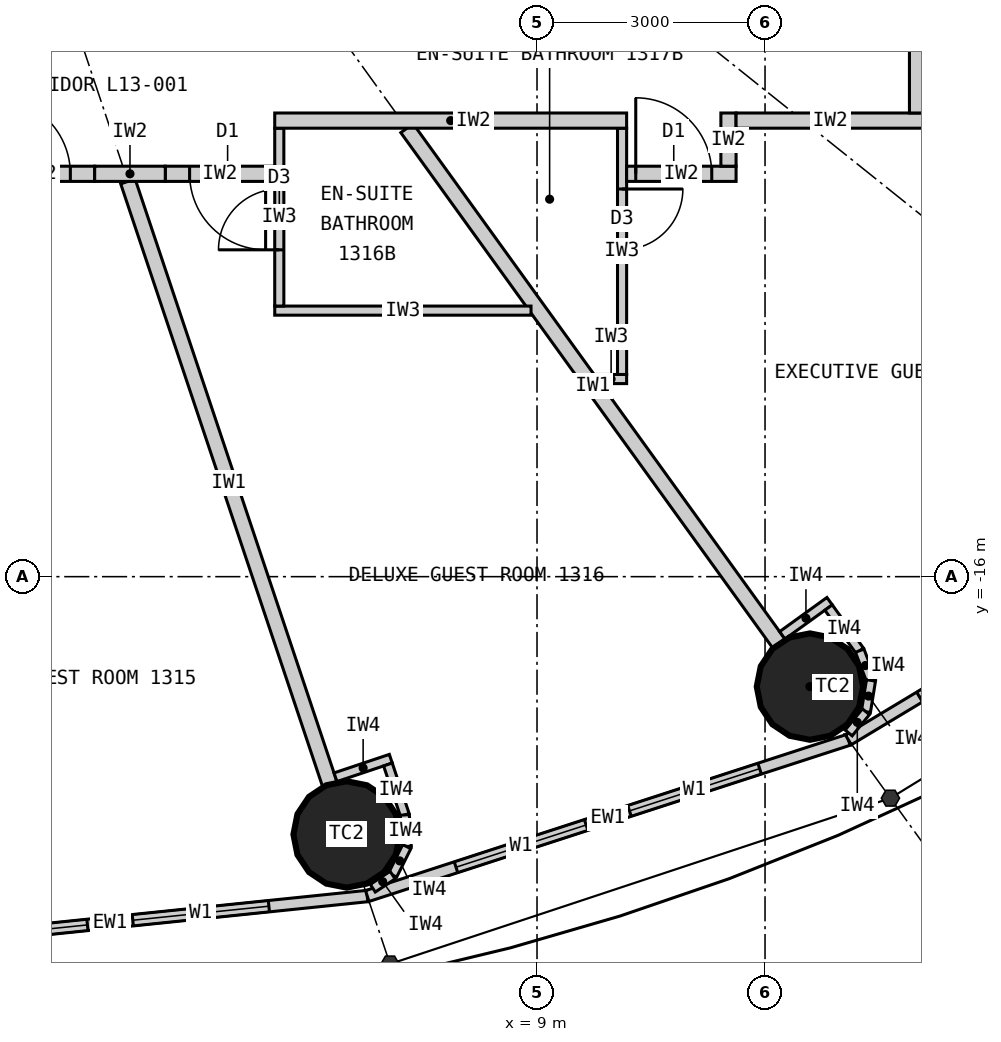
"""IFC4 building model, lengths in metres.
Left out: names, types, materials, properties, quantities, classifications, styles, units other than length and angle.
Written with IfcOpenShell. Run it as: python <this file> out.ifc"""

import sys

from ifc_helpers import new_model, si_unit, direction, frame, frame_2d, origin, origin_2d, place, context, subcontext, project, spatial, rectangle, circle, extrude, element, fill, save


model = new_model("IFC4")
c1 = context("Model", 3, precision=1e-05, world=origin(), true_north=direction((0.0, 1.0)))
c2 = subcontext(c1, "Body", "Model", "MODEL_VIEW")
j1 = project(units=[si_unit("LENGTHUNIT", "METRE"), si_unit("PLANEANGLEUNIT", "RADIAN")], contexts=[c1])
p1 = place(None, origin())
s1 = spatial("IfcSite", under=j1, at=p1, CompositionType="ELEMENT")
p2 = place(p1, origin())
s2 = spatial("IfcBuilding", under=s1, at=p2, CompositionType="ELEMENT")
p3 = place(p2, frame((0.0, 0.0, 57.3)))
s3 = spatial("IfcBuildingStorey", under=s2, at=p3, CompositionType="ELEMENT", Elevation=57.3)
for number, where, z_axis, x_axis in (
    (1, (6.495, -19.391, 0.0), (0.0, 0.0, 1.0), (1.0, 0.0, 0.0)),
    (2, (12.591, -17.447, 0.0), (0.0, 0.0, 1.0), (1.0, 0.0, 0.0)),
):
    element("IfcColumn", number, at=place(p3, frame(where, z_axis=z_axis, x_axis=x_axis)), inside=s3, PredefinedType="COLUMN", context=c2, shape_type="SweptSolid", body=[
        extrude(circle(Radius=0.7, at=origin_2d()), origin(), (0.0, 0.0, 1.0), 3.3),
    ])
p4 = place(p3, frame((0.0, -20.9, 0.0), z_axis=(0.0, 0.0, 1.0), x_axis=(0.994721394369, 0.102612609291, 0.0)))
e3 = element("IfcWall", 3, at=p4, inside=s3, PredefinedType="ELEMENTEDWALL", context=c2, shape_type="SweptSolid", body=[
    extrude(rectangle(XDim=6.802, YDim=0.15, at=frame_2d((3.401, 0.0))), origin(), (0.0, 0.0, 1.0), 3.12),
])
p5 = place(p4, frame((1.301, 0.0, 0.9)))
e4 = element("IfcOpeningElement", 4, at=p5, cuts=e3, PredefinedType="OPENING", context=c2, shape_type="SweptSolid", body=[
    extrude(rectangle(XDim=1.8, YDim=1.9, at=frame_2d((0.9, 0.95))), frame((0.0, 0.085, 0.0), z_axis=(0.0, -1.0, 0.0), x_axis=(1.0, 0.0, 0.0)), (0.0, 0.0, 1.0), 0.17),
])
p6 = place(p4, frame((3.701, 0.0, 0.9)))
e5 = element("IfcOpeningElement", 5, at=p6, cuts=e3, PredefinedType="OPENING", context=c2, shape_type="SweptSolid", body=[
    extrude(rectangle(XDim=1.8, YDim=1.9, at=frame_2d((0.9, 0.95))), frame((0.0, 0.085, 0.0), z_axis=(0.0, -1.0, 0.0), x_axis=(1.0, 0.0, 0.0)), (0.0, 0.0, 1.0), 0.17),
])
p7 = place(p3, frame((6.766, -20.202, 0.0), z_axis=(0.0, 0.0, 1.0), x_axis=(0.951137534625, 0.308767534285, 0.0)))
e6 = element("IfcWall", 6, at=p7, inside=s3, PredefinedType="ELEMENTEDWALL", context=c2, shape_type="SweptSolid", body=[
    extrude(rectangle(XDim=6.655, YDim=0.15, at=frame_2d((3.328, 0.0))), origin(), (0.0, 0.0, 1.0), 3.12),
])
p8 = place(p7, frame((1.228, 0.0, 0.9)))
e7 = element("IfcOpeningElement", 7, at=p8, cuts=e6, PredefinedType="OPENING", context=c2, shape_type="SweptSolid", body=[
    extrude(rectangle(XDim=1.8, YDim=1.9, at=frame_2d((0.9, 0.95))), frame((0.0, 0.085, 0.0), z_axis=(0.0, -1.0, 0.0), x_axis=(1.0, 0.0, 0.0)), (0.0, 0.0, 1.0), 0.17),
])
p9 = place(p7, frame((3.628, 0.0, 0.9)))
e8 = element("IfcOpeningElement", 8, at=p9, cuts=e6, PredefinedType="OPENING", context=c2, shape_type="SweptSolid", body=[
    extrude(rectangle(XDim=1.8, YDim=1.9, at=frame_2d((0.9, 0.95))), frame((0.0, 0.085, 0.0), z_axis=(0.0, -1.0, 0.0), x_axis=(1.0, 0.0, 0.0)), (0.0, 0.0, 1.0), 0.17),
])
p10 = place(p3, frame((13.096, -18.147, 0.0), z_axis=(0.0, 0.0, 1.0), x_axis=(0.856983180864, 0.515344377787, 0.0)))
e9 = element("IfcWall", 9, at=p10, inside=s3, PredefinedType="ELEMENTEDWALL", context=c2, shape_type="SweptSolid", body=[
    extrude(rectangle(XDim=6.386, YDim=0.15, at=frame_2d((3.193, 0.0))), origin(), (0.0, 0.0, 1.0), 3.12),
])
p11 = place(p10, frame((1.093, 0.0, 0.9)))
e10 = element("IfcOpeningElement", 10, at=p11, cuts=e9, PredefinedType="OPENING", context=c2, shape_type="SweptSolid", body=[
    extrude(rectangle(XDim=1.8, YDim=1.9, at=frame_2d((0.9, 0.95))), frame((0.0, 0.085, 0.0), z_axis=(0.0, -1.0, 0.0), x_axis=(1.0, 0.0, 0.0)), (0.0, 0.0, 1.0), 0.17),
])
p12 = place(p10, frame((3.493, 0.0, 0.9)))
e11 = element("IfcOpeningElement", 11, at=p12, cuts=e9, PredefinedType="OPENING", context=c2, shape_type="SweptSolid", body=[
    extrude(rectangle(XDim=1.8, YDim=1.9, at=frame_2d((0.9, 0.95))), frame((0.0, 0.085, 0.0), z_axis=(0.0, -1.0, 0.0), x_axis=(1.0, 0.0, 0.0)), (0.0, 0.0, 1.0), 0.17),
])
p13 = place(p3, frame((3.617, -10.8, 0.0), z_axis=(0.0, 0.0, 1.0), x_axis=(0.317576599239, -0.948232621046, 0.0)))
e12 = element("IfcWall", 12, at=p13, inside=s3, PredefinedType="PARTITIONING", context=c2, shape_type="SweptSolid", body=[
    extrude(rectangle(XDim=8.36, YDim=0.2, at=frame_2d((4.18, 0.0))), origin(), (0.0, 0.0, 1.0), 2.32),
])
p14 = place(p3, frame((7.289, -10.1, 0.0), z_axis=(0.0, 0.0, 1.0), x_axis=(0.585198353053, -0.810890182197, 0.0)))
e13 = element("IfcWall", 13, at=p14, inside=s3, PredefinedType="PARTITIONING", context=c2, shape_type="SweptSolid", body=[
    extrude(rectangle(XDim=8.36, YDim=0.2, at=frame_2d((4.18, 0.0))), origin(), (0.0, 0.0, 1.0), 2.32),
])
p15 = place(p3, frame((14.1, -8.639, 0.0), z_axis=(0.0, 0.0, 1.0), x_axis=(0.852672493023, -0.522445805459, 0.0)))
e14 = element("IfcWall", 14, at=p15, inside=s3, PredefinedType="PARTITIONING", context=c2, shape_type="SweptSolid", body=[
    extrude(rectangle(XDim=7.633, YDim=0.2, at=frame_2d((3.817, 0.0))), origin(), (0.0, 0.0, 1.0), 3.12),
])
p16 = place(p3, frame((8.921, -12.5, 0.0), z_axis=(0.0, 0.0, 1.0), x_axis=(-1.0, 0.0, 0.0)))
e15 = element("IfcWall", 15, at=p16, inside=s3, PredefinedType="PARTITIONING", context=c2, shape_type="SweptSolid", body=[
    extrude(rectangle(XDim=3.372, YDim=0.12, at=frame_2d((1.686, 0.0))), origin(), (0.0, 0.0, 1.0), 3.12),
])
p17 = place(p3, frame((5.609, -10.1, 0.0), z_axis=(0.0, 0.0, 1.0), x_axis=(0.0, -1.0, 0.0)))
e16 = element("IfcWall", 16, at=p17, inside=s3, PredefinedType="PARTITIONING", context=c2, shape_type="SweptSolid", body=[
    extrude(rectangle(XDim=2.34, YDim=0.12, at=frame_2d((1.17, 0.0))), origin(), (0.0, 0.0, 1.0), 3.12),
])
p18 = place(p17, frame((0.8, 0.0, 0.0)))
e17 = element("IfcOpeningElement", 17, at=p18, cuts=e16, PredefinedType="OPENING", context=c2, shape_type="SweptSolid", body=[
    extrude(rectangle(XDim=0.8, YDim=2.1, at=frame_2d((0.4, 1.05))), frame((0.0, 0.07, 0.0), z_axis=(0.0, -1.0, 0.0), x_axis=(1.0, 0.0, 0.0)), (0.0, 0.0, 1.0), 0.14),
])
p19 = place(p3, frame((9.771, -13.4, 0.0), z_axis=(0.0, 0.0, 1.0), x_axis=(1.0, 0.0, 0.0)))
e18 = element("IfcWall", 18, at=p19, inside=s3, PredefinedType="PARTITIONING", context=c2, shape_type="SweptSolid", body=[
    extrude(rectangle(XDim=0.408, YDim=0.12, at=frame_2d((0.204, 0.0))), origin(), (0.0, 0.0, 1.0), 3.12),
])
p20 = place(p3, frame((10.119, -10.1, 0.0), z_axis=(0.0, 0.0, 1.0), x_axis=(0.0, -1.0, 0.0)))
e19 = element("IfcWall", 19, at=p20, inside=s3, PredefinedType="PARTITIONING", context=c2, shape_type="SweptSolid", body=[
    extrude(rectangle(XDim=3.24, YDim=0.12, at=frame_2d((1.62, 0.0))), origin(), (0.0, 0.0, 1.0), 3.12),
])
p21 = place(p20, frame((0.8, 0.0, 0.0)))
e20 = element("IfcOpeningElement", 20, at=p21, cuts=e19, PredefinedType="OPENING", context=c2, shape_type="SweptSolid", body=[
    extrude(rectangle(XDim=0.8, YDim=2.1, at=frame_2d((0.4, 1.05))), frame((0.0, 0.07, 0.0), z_axis=(0.0, -1.0, 0.0), x_axis=(1.0, 0.0, 0.0)), (0.0, 0.0, 1.0), 0.14),
])
p22 = place(p3, frame((3.18, -10.7, 0.0), z_axis=(0.0, 0.0, 1.0), x_axis=(-1.0, 0.0, 0.0)))
e21 = element("IfcWall", 21, at=p22, inside=s3, PredefinedType="PARTITIONING", context=c2, shape_type="SweptSolid", body=[
    extrude(rectangle(XDim=1.44, YDim=0.2, at=frame_2d((0.72, 0.0))), origin(), (0.0, 0.0, 1.0), 3.12),
])
p23 = place(p22, frame((0.32, 0.0, 0.0)))
e22 = element("IfcOpeningElement", 22, at=p23, cuts=e21, PredefinedType="OPENING", context=c2, shape_type="SweptSolid", body=[
    extrude(rectangle(XDim=1.0, YDim=2.2, at=frame_2d((0.5, 1.1))), frame((0.0, 0.11, 0.0), z_axis=(0.0, -1.0, 0.0), x_axis=(1.0, 0.0, 0.0)), (0.0, 0.0, 1.0), 0.22),
])
p24 = place(p3, frame((5.549, -10.7, 0.0), z_axis=(0.0, 0.0, 1.0), x_axis=(-1.0, 0.0, 0.0)))
e23 = element("IfcWall", 23, at=p24, inside=s3, PredefinedType="PARTITIONING", context=c2, shape_type="SweptSolid", body=[
    extrude(rectangle(XDim=1.44, YDim=0.2, at=frame_2d((0.72, 0.0))), origin(), (0.0, 0.0, 1.0), 3.12),
])
p25 = place(p24, frame((0.12, 0.0, 0.0)))
e24 = element("IfcOpeningElement", 24, at=p25, cuts=e23, PredefinedType="OPENING", context=c2, shape_type="SweptSolid", body=[
    extrude(rectangle(XDim=1.0, YDim=2.2, at=frame_2d((0.5, 1.1))), frame((0.0, 0.11, 0.0), z_axis=(0.0, -1.0, 0.0), x_axis=(1.0, 0.0, 0.0)), (0.0, 0.0, 1.0), 0.22),
])
p26 = place(p3, frame((11.619, -10.7, 0.0), z_axis=(0.0, 0.0, 1.0), x_axis=(-1.0, 0.0, 0.0)))
e25 = element("IfcWall", 25, at=p26, inside=s3, PredefinedType="PARTITIONING", context=c2, shape_type="SweptSolid", body=[
    extrude(rectangle(XDim=1.44, YDim=0.2, at=frame_2d((0.72, 0.0))), origin(), (0.0, 0.0, 1.0), 3.12),
])
p27 = place(p26, frame((0.32, 0.0, 0.0)))
e26 = element("IfcOpeningElement", 26, at=p27, cuts=e25, PredefinedType="OPENING", context=c2, shape_type="SweptSolid", body=[
    extrude(rectangle(XDim=1.0, YDim=2.2, at=frame_2d((0.5, 1.1))), frame((0.0, 0.11, 0.0), z_axis=(0.0, -1.0, 0.0), x_axis=(1.0, 0.0, 0.0)), (0.0, 0.0, 1.0), 0.22),
])
p28 = place(p3, frame((11.519, -9.9, 0.0), z_axis=(0.0, 0.0, 1.0), x_axis=(0.0, -1.0, 0.0)))
e27 = element("IfcWall", 27, at=p28, inside=s3, PredefinedType="PARTITIONING", context=c2, shape_type="SweptSolid", body=[
    extrude(rectangle(XDim=0.7, YDim=0.2, at=frame_2d((0.35, 0.0))), origin(), (0.0, 0.0, 1.0), 3.12),
])
p29 = place(p3, frame((4.109, -10.7, 0.0), z_axis=(0.0, 0.0, 1.0), x_axis=(-1.0, 0.0, 0.0)))
e28 = element("IfcWall", 28, at=p29, inside=s3, PredefinedType="PARTITIONING", context=c2, shape_type="SweptSolid", body=[
    extrude(rectangle(XDim=0.929, YDim=0.2, at=frame_2d((0.465, 0.0))), origin(), (0.0, 0.0, 1.0), 3.12),
])
p30 = place(p3, frame((14.1, -10.0, 0.0), z_axis=(0.0, 0.0, 1.0), x_axis=(-1.0, 0.0, 0.0)))
e29 = element("IfcWall", 29, at=p30, inside=s3, PredefinedType="PARTITIONING", context=c2, shape_type="SweptSolid", body=[
    extrude(rectangle(XDim=2.481, YDim=0.2, at=frame_2d((1.24, 0.0))), origin(), (0.0, 0.0, 1.0), 3.12),
])
p31 = place(p3, frame((10.179, -10.0, 0.0), z_axis=(0.0, 0.0, 1.0), x_axis=(-1.0, 0.0, 0.0)))
e30 = element("IfcWall", 30, at=p31, inside=s3, PredefinedType="PARTITIONING", context=c2, shape_type="SweptSolid", body=[
    extrude(rectangle(XDim=4.63, YDim=0.2, at=frame_2d((2.315, 0.0))), origin(), (0.0, 0.0, 1.0), 3.12),
])
p32 = place(p3, frame((14.0, -9.9, 0.0), z_axis=(0.0, 0.0, 1.0), x_axis=(0.0, 1.0, 0.0)))
e31 = element("IfcWall", 31, at=p32, inside=s3, PredefinedType="PARTITIONING", context=c2, shape_type="SweptSolid", body=[
    extrude(rectangle(XDim=3.001, YDim=0.2, at=frame_2d((1.5, 0.0))), origin(), (0.0, 0.0, 1.0), 3.12),
])
p33 = place(p3, frame((6.348, -18.639, 0.0), z_axis=(0.0, 0.0, 1.0), x_axis=(0.948268951266, 0.317468102437, 0.0)))
e32 = element("IfcWall", 32, at=p33, inside=s3, PredefinedType="PARTITIONING", context=c2, shape_type="SweptSolid", body=[
    extrude(rectangle(XDim=0.768, YDim=0.12, at=frame_2d((0.384, 0.0))), origin(), (0.0, 0.0, 1.0), 3.12),
])
p34 = place(p3, frame((7.038, -18.471, 0.0), z_axis=(0.0, 0.0, 1.0), x_axis=(0.317378466199, -0.9482989556, 0.0)))
e33 = element("IfcWall", 33, at=p34, inside=s3, PredefinedType="PARTITIONING", context=c2, shape_type="SweptSolid", body=[
    extrude(rectangle(XDim=0.7, YDim=0.12, at=frame_2d((0.35, 0.0))), origin(), (0.0, 0.0, 1.0), 3.12),
])
p35 = place(p3, frame((7.26, -19.135, 0.0), z_axis=(0.0, 0.0, 1.0), x_axis=(0.0613238046, -0.99811792439, 0.0)))
e34 = element("IfcWall", 34, at=p35, inside=s3, PredefinedType="PARTITIONING", context=c2, shape_type="SweptSolid", body=[
    extrude(rectangle(XDim=0.418, YDim=0.12, at=frame_2d((0.209, 0.0))), origin(), (0.0, 0.0, 1.0), 3.12),
])
p36 = place(p3, frame((7.286, -19.552, 0.0), z_axis=(0.0, 0.0, 1.0), x_axis=(-0.445810757773, -0.89512723579, 0.0)))
e35 = element("IfcWall", 35, at=p36, inside=s3, PredefinedType="PARTITIONING", context=c2, shape_type="SweptSolid", body=[
    extrude(rectangle(XDim=0.418, YDim=0.12, at=frame_2d((0.209, 0.0))), origin(), (0.0, 0.0, 1.0), 3.12),
])
p37 = place(p3, frame((7.1, -19.926, 0.0), z_axis=(0.0, 0.0, 1.0), x_axis=(-0.833488262509, -0.552537162787, 0.0)))
e36 = element("IfcWall", 36, at=p37, inside=s3, PredefinedType="PARTITIONING", context=c2, shape_type="SweptSolid", body=[
    extrude(rectangle(XDim=0.313, YDim=0.12, at=frame_2d((0.156, 0.0))), origin(), (0.0, 0.0, 1.0), 3.12),
])
p38 = place(p3, frame((12.227, -16.772, 0.0), z_axis=(0.0, 0.0, 1.0), x_axis=(0.810821798253, 0.585293098778, 0.0)))
e37 = element("IfcWall", 37, at=p38, inside=s3, PredefinedType="PARTITIONING", context=c2, shape_type="SweptSolid", body=[
    extrude(rectangle(XDim=0.768, YDim=0.12, at=frame_2d((0.384, 0.0))), origin(), (0.0, 0.0, 1.0), 3.12),
])
p39 = place(p3, frame((12.836, -16.406, 0.0), z_axis=(0.0, 0.0, 1.0), x_axis=(0.585223113993, -0.810872312296, 0.0)))
e38 = element("IfcWall", 38, at=p39, inside=s3, PredefinedType="PARTITIONING", context=c2, shape_type="SweptSolid", body=[
    extrude(rectangle(XDim=0.7, YDim=0.12, at=frame_2d((0.35, 0.0))), origin(), (0.0, 0.0, 1.0), 3.12),
])
p40 = place(p3, frame((13.246, -16.974, 0.0), z_axis=(0.0, 0.0, 1.0), x_axis=(0.355728122235, -0.934589483705, 0.0)))
e39 = element("IfcWall", 39, at=p40, inside=s3, PredefinedType="PARTITIONING", context=c2, shape_type="SweptSolid", body=[
    extrude(rectangle(XDim=0.418, YDim=0.12, at=frame_2d((0.209, 0.0))), origin(), (0.0, 0.0, 1.0), 3.12),
])
p41 = place(p3, frame((13.394, -17.365, 0.0), z_axis=(0.0, 0.0, 1.0), x_axis=(-0.159379276926, -0.987217425943, 0.0)))
e40 = element("IfcWall", 40, at=p41, inside=s3, PredefinedType="PARTITIONING", context=c2, shape_type="SweptSolid", body=[
    extrude(rectangle(XDim=0.418, YDim=0.12, at=frame_2d((0.209, 0.0))), origin(), (0.0, 0.0, 1.0), 3.12),
])
p42 = place(p3, frame((13.328, -17.777, 0.0), z_axis=(0.0, 0.0, 1.0), x_axis=(-0.632276783541, -0.774742582407, 0.0)))
e41 = element("IfcWall", 41, at=p42, inside=s3, PredefinedType="PARTITIONING", context=c2, shape_type="SweptSolid", body=[
    extrude(rectangle(XDim=0.36, YDim=0.12, at=frame_2d((0.18, 0.0))), origin(), (0.0, 0.0, 1.0), 3.12),
])
p43 = place(p5, origin())
e42 = element("IfcWindow", 42, at=p43, inside=s3, PartitioningType="SINGLE_PANEL", PredefinedType="WINDOW", context=c2, shape_type="SweptSolid", body=[
    extrude(rectangle(XDim=1.8, YDim=1.9, at=frame_2d((0.9, 0.95))), frame((0.0, 0.03, 0.0), z_axis=(0.0, -1.0, 0.0), x_axis=(1.0, 0.0, 0.0)), (0.0, 0.0, 1.0), 0.06),
])
fill(e4, e42)
p44 = place(p6, origin())
e43 = element("IfcWindow", 43, at=p44, inside=s3, PartitioningType="SINGLE_PANEL", PredefinedType="WINDOW", context=c2, shape_type="SweptSolid", body=[
    extrude(rectangle(XDim=1.8, YDim=1.9, at=frame_2d((0.9, 0.95))), frame((0.0, 0.03, 0.0), z_axis=(0.0, -1.0, 0.0), x_axis=(1.0, 0.0, 0.0)), (0.0, 0.0, 1.0), 0.06),
])
fill(e5, e43)
p45 = place(p8, origin())
e44 = element("IfcWindow", 44, at=p45, inside=s3, PartitioningType="SINGLE_PANEL", PredefinedType="WINDOW", context=c2, shape_type="SweptSolid", body=[
    extrude(rectangle(XDim=1.8, YDim=1.9, at=frame_2d((0.9, 0.95))), frame((0.0, 0.03, 0.0), z_axis=(0.0, -1.0, 0.0), x_axis=(1.0, 0.0, 0.0)), (0.0, 0.0, 1.0), 0.06),
])
fill(e7, e44)
p46 = place(p9, origin())
e45 = element("IfcWindow", 45, at=p46, inside=s3, PartitioningType="SINGLE_PANEL", PredefinedType="WINDOW", context=c2, shape_type="SweptSolid", body=[
    extrude(rectangle(XDim=1.8, YDim=1.9, at=frame_2d((0.9, 0.95))), frame((0.0, 0.03, 0.0), z_axis=(0.0, -1.0, 0.0), x_axis=(1.0, 0.0, 0.0)), (0.0, 0.0, 1.0), 0.06),
])
fill(e8, e45)
p47 = place(p11, origin())
e46 = element("IfcWindow", 46, at=p47, inside=s3, PartitioningType="SINGLE_PANEL", PredefinedType="WINDOW", context=c2, shape_type="SweptSolid", body=[
    extrude(rectangle(XDim=1.8, YDim=1.9, at=frame_2d((0.9, 0.95))), frame((0.0, 0.03, 0.0), z_axis=(0.0, -1.0, 0.0), x_axis=(1.0, 0.0, 0.0)), (0.0, 0.0, 1.0), 0.06),
])
fill(e10, e46)
p48 = place(p23, origin())
e47 = element("IfcDoor", 47, at=p48, inside=s3, OperationType="SINGLE_SWING_RIGHT", PredefinedType="DOOR", context=c2, shape_type="SweptSolid", body=[
    extrude(rectangle(XDim=1.0, YDim=2.2, at=frame_2d((0.5, 1.1))), frame((0.0, 0.025, 0.0), z_axis=(0.0, -1.0, 0.0), x_axis=(1.0, 0.0, 0.0)), (0.0, 0.0, 1.0), 0.05),
])
fill(e22, e47)
p49 = place(p18, origin())
e48 = element("IfcDoor", 48, at=p49, inside=s3, OperationType="SINGLE_SWING_RIGHT", PredefinedType="DOOR", context=c2, shape_type="SweptSolid", body=[
    extrude(rectangle(XDim=0.8, YDim=2.1, at=frame_2d((0.4, 1.05))), frame((0.0, 0.025, 0.0), z_axis=(0.0, -1.0, 0.0), x_axis=(1.0, 0.0, 0.0)), (0.0, 0.0, 1.0), 0.05),
])
fill(e17, e48)
p50 = place(p25, origin())
e49 = element("IfcDoor", 49, at=p50, inside=s3, OperationType="SINGLE_SWING_LEFT", PredefinedType="DOOR", context=c2, shape_type="SweptSolid", body=[
    extrude(rectangle(XDim=1.0, YDim=2.2, at=frame_2d((0.5, 1.1))), frame((0.0, 0.025, 0.0), z_axis=(0.0, -1.0, 0.0), x_axis=(1.0, 0.0, 0.0)), (0.0, 0.0, 1.0), 0.05),
])
fill(e24, e49)
p51 = place(p21, origin())
e50 = element("IfcDoor", 50, at=p51, inside=s3, OperationType="SINGLE_SWING_LEFT", PredefinedType="DOOR", context=c2, shape_type="SweptSolid", body=[
    extrude(rectangle(XDim=0.8, YDim=2.1, at=frame_2d((0.4, 1.05))), frame((0.0, 0.025, 0.0), z_axis=(0.0, -1.0, 0.0), x_axis=(1.0, 0.0, 0.0)), (0.0, 0.0, 1.0), 0.05),
])
fill(e20, e50)
p52 = place(p27, origin())
e51 = element("IfcDoor", 51, at=p52, inside=s3, OperationType="SINGLE_SWING_RIGHT", PredefinedType="DOOR", context=c2, shape_type="SweptSolid", body=[
    extrude(rectangle(XDim=1.0, YDim=2.2, at=frame_2d((0.5, 1.1))), frame((0.0, 0.025, 0.0), z_axis=(0.0, -1.0, 0.0), x_axis=(1.0, 0.0, 0.0)), (0.0, 0.0, 1.0), 0.05),
])
fill(e26, e51)
save(model, sys.argv[1])
